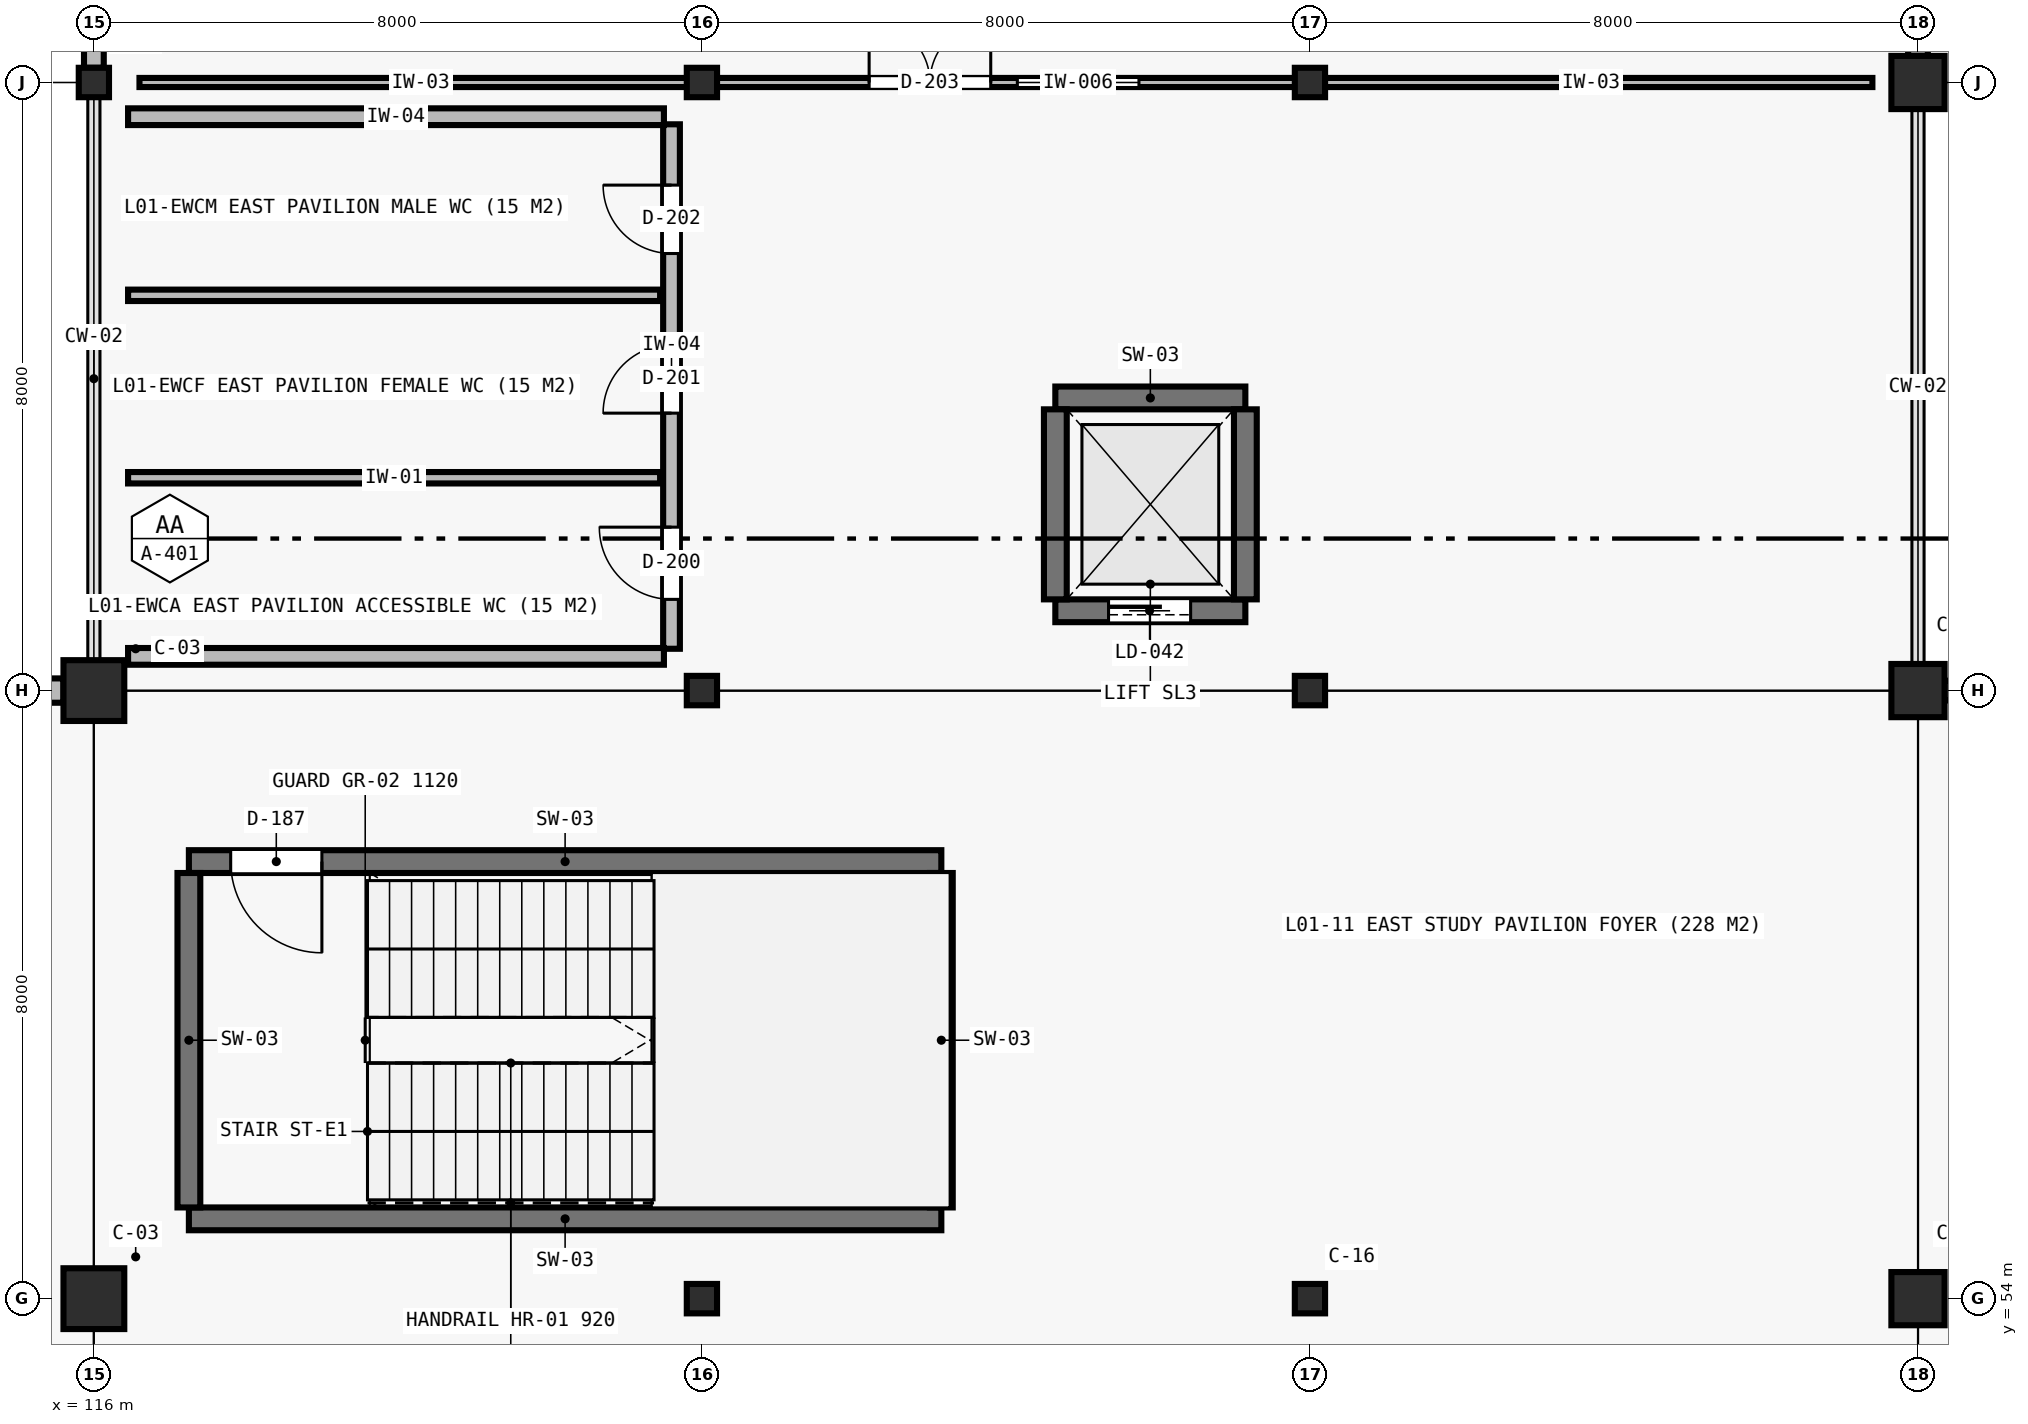
"""IFC4 building model, lengths in metres.
Left out: names, types, materials, properties, quantities, classifications, styles, units other than length and angle.
Written with IfcOpenShell. Run it as: python <this file> out.ifc"""

import sys

from ifc_helpers import new_model, si_unit, direction, frame, frame_2d, origin, origin_2d, place, context, subcontext, project, spatial, rectangle, i_section, extrude, element, fill, save


model = new_model("IFC4")
c1 = context("Model", 3, precision=1e-05, world=origin(), true_north=direction((0.0, 1.0)))
c2 = subcontext(c1, "Body", "Model", "MODEL_VIEW")
j1 = project(units=[si_unit("LENGTHUNIT", "METRE"), si_unit("PLANEANGLEUNIT", "RADIAN")], contexts=[c1])
p1 = place(None, origin())
s1 = spatial("IfcSite", under=j1, at=p1, CompositionType="ELEMENT")
p2 = place(p1, origin())
s2 = spatial("IfcBuilding", under=s1, at=p2, CompositionType="ELEMENT")
p3 = place(p2, frame((0.0, 0.0, 6.3)))
s3 = spatial("IfcBuildingStorey", under=s2, at=p3, CompositionType="ELEMENT", Elevation=6.3)
for number, where, z_axis, x_axis in (
    (1, (116.0, 54.0, 0.0), (0.0, 0.0, 1.0), (1.0, 0.0, 0.0)),
    (2, (116.0, 62.0, 0.0), (0.0, 0.0, 1.0), (1.0, 0.0, 0.0)),
):
    element("IfcColumn", number, at=place(p3, frame(where, z_axis=z_axis, x_axis=x_axis)), inside=s3, PredefinedType="COLUMN", context=c2, shape_type="SweptSolid", body=[
        extrude(rectangle(XDim=0.8, YDim=0.8, at=origin_2d()), origin(), (0.0, 0.0, 1.0), 4.6),
    ])
for number, where, z_axis, x_axis in (
    (3, (116.0, 70.0, 0.0), (0.0, 0.0, 1.0), (1.0, 0.0, 0.0)),
    (4, (124.0, 54.0, 0.0), (0.0, 0.0, 1.0), (1.0, 0.0, 0.0)),
    (5, (124.0, 62.0, 0.0), (0.0, 0.0, 1.0), (1.0, 0.0, 0.0)),
    (6, (124.0, 70.0, 0.0), (0.0, 0.0, 1.0), (1.0, 0.0, 0.0)),
    (7, (132.0, 54.0, 0.0), (0.0, 0.0, 1.0), (1.0, 0.0, 0.0)),
    (8, (132.0, 62.0, 0.0), (0.0, 0.0, 1.0), (1.0, 0.0, 0.0)),
    (9, (132.0, 70.0, 0.0), (0.0, 0.0, 1.0), (1.0, 0.0, 0.0)),
):
    element("IfcColumn", number, at=place(p3, frame(where, z_axis=z_axis, x_axis=x_axis)), inside=s3, PredefinedType="COLUMN", context=c2, shape_type="SweptSolid", body=[
        extrude(i_section(OverallWidth=0.398, OverallDepth=0.387, WebThickness=0.021, FlangeThickness=0.033, at=origin_2d()), origin(), (0.0, 0.0, 1.0), 4.6),
    ])
for number, where, z_axis, x_axis in (
    (10, (140.0, 54.0, 0.0), (0.0, 0.0, 1.0), (1.0, 0.0, 0.0)),
    (11, (140.0, 62.0, 0.0), (0.0, 0.0, 1.0), (1.0, 0.0, 0.0)),
    (12, (140.0, 70.0, 0.0), (0.0, 0.0, 1.0), (1.0, 0.0, 0.0)),
):
    element("IfcColumn", number, at=place(p3, frame(where, z_axis=z_axis, x_axis=x_axis)), inside=s3, PredefinedType="COLUMN", context=c2, shape_type="SweptSolid", body=[
        extrude(rectangle(XDim=0.7, YDim=0.7, at=origin_2d()), origin(), (0.0, 0.0, 1.0), 4.6),
    ])
p4 = place(p3, frame((117.25, 59.75, 0.0), z_axis=(0.0, 0.0, 1.0), x_axis=(1.0, 0.0, 0.0)))
e13 = element("IfcWall", 13, at=p4, inside=s3, PredefinedType="SHEAR", context=c2, shape_type="SweptSolid", body=[
    extrude(rectangle(XDim=9.9, YDim=0.3, at=frame_2d((4.95, 0.0))), origin(), (0.0, 0.0, 1.0), 4.6),
])
p5 = place(p4, frame((0.55, 0.0, 0.0)))
e14 = element("IfcOpeningElement", 14, at=p5, cuts=e13, PredefinedType="OPENING", context=c2, shape_type="SweptSolid", body=[
    extrude(rectangle(XDim=1.2, YDim=2.2, at=frame_2d((0.6, 1.1))), frame((0.0, 0.16, 0.0), z_axis=(0.0, -1.0, 0.0), x_axis=(1.0, 0.0, 0.0)), (0.0, 0.0, 1.0), 0.32),
])
p6 = place(p3, frame((117.25, 55.05, 0.0), z_axis=(0.0, 0.0, 1.0), x_axis=(1.0, 0.0, 0.0)))
e15 = element("IfcWall", 15, at=p6, inside=s3, PredefinedType="SHEAR", context=c2, shape_type="SweptSolid", body=[
    extrude(rectangle(XDim=9.9, YDim=0.3, at=frame_2d((4.95, 0.0))), origin(), (0.0, 0.0, 1.0), 4.6),
])
for number, where, z_axis, x_axis in (
    (16, (117.25, 55.2, 0.0), (0.0, 0.0, 1.0), (0.0, 1.0, 0.0)),
    (17, (127.15, 55.2, 0.0), (0.0, 0.0, 1.0), (0.0, 1.0, 0.0)),
):
    element("IfcWall", number, at=place(p3, frame(where, z_axis=z_axis, x_axis=x_axis)), inside=s3, PredefinedType="SHEAR", context=c2, shape_type="SweptSolid", body=[
        extrude(rectangle(XDim=4.4, YDim=0.3, at=frame_2d((2.2, 0.0))), origin(), (0.0, 0.0, 1.0), 4.6),
    ])
p7 = place(p3, frame((128.65, 65.85, 0.0), z_axis=(0.0, 0.0, 1.0), x_axis=(1.0, 0.0, 0.0)))
e18 = element("IfcWall", 18, at=p7, inside=s3, PredefinedType="SHEAR", context=c2, shape_type="SweptSolid", body=[
    extrude(rectangle(XDim=2.5, YDim=0.3, at=frame_2d((1.25, 0.0))), origin(), (0.0, 0.0, 1.0), 4.6),
])
p8 = place(p3, frame((128.65, 63.05, 0.0), z_axis=(0.0, 0.0, 1.0), x_axis=(1.0, 0.0, 0.0)))
e19 = element("IfcWall", 19, at=p8, inside=s3, PredefinedType="SHEAR", context=c2, shape_type="SweptSolid", body=[
    extrude(rectangle(XDim=2.5, YDim=0.3, at=frame_2d((1.25, 0.0))), origin(), (0.0, 0.0, 1.0), 4.6),
])
p9 = place(p8, frame((0.7, 0.0, 0.0)))
e20 = element("IfcOpeningElement", 20, at=p9, cuts=e19, PredefinedType="OPENING", context=c2, shape_type="SweptSolid", body=[
    extrude(rectangle(XDim=1.08, YDim=2.2, at=frame_2d((0.54, 1.1))), frame((0.0, 0.16, 0.0), z_axis=(0.0, -1.0, 0.0), x_axis=(1.0, 0.0, 0.0)), (0.0, 0.0, 1.0), 0.32),
])
for number, where, z_axis, x_axis in (
    (21, (128.65, 63.2, 0.0), (0.0, 0.0, 1.0), (0.0, 1.0, 0.0)),
    (22, (131.15, 63.2, 0.0), (0.0, 0.0, 1.0), (0.0, 1.0, 0.0)),
):
    element("IfcWall", number, at=place(p3, frame(where, z_axis=z_axis, x_axis=x_axis)), inside=s3, PredefinedType="SHEAR", context=c2, shape_type="SweptSolid", body=[
        extrude(rectangle(XDim=2.5, YDim=0.3, at=frame_2d((1.25, 0.0))), origin(), (0.0, 0.0, 1.0), 4.6),
    ])
p10 = place(p3, frame((108.4, 62.0, 0.0), z_axis=(0.0, 0.0, 1.0), x_axis=(1.0, 0.0, 0.0)))
e23 = element("IfcWall", 23, at=p10, inside=s3, PredefinedType="STANDARD", context=c2, shape_type="SweptSolid", body=[
    extrude(rectangle(XDim=7.2, YDim=0.32, at=frame_2d((3.6, 0.0))), origin(), (0.0, 0.0, 1.0), 3.85),
])
p11 = place(p10, frame((2.25, 0.0, 0.95)))
e24 = element("IfcOpeningElement", 24, at=p11, cuts=e23, PredefinedType="OPENING", context=c2, shape_type="SweptSolid", body=[
    extrude(rectangle(XDim=2.7, YDim=1.95, at=frame_2d((1.35, 0.975))), frame((0.0, 0.17, 0.0), z_axis=(0.0, -1.0, 0.0), x_axis=(1.0, 0.0, 0.0)), (0.0, 0.0, 1.0), 0.34),
])
p12 = place(p3, frame((116.0, 70.194, 0.0), z_axis=(0.0, 0.0, 1.0), x_axis=(0.0, 1.0, 0.0)))
e25 = element("IfcWall", 25, at=p12, inside=s3, PredefinedType="STANDARD", context=c2, shape_type="SweptSolid", body=[
    extrude(rectangle(XDim=7.613, YDim=0.26, at=frame_2d((3.806, 0.0))), origin(), (0.0, 0.0, 1.0), 3.85),
])
p13 = place(p12, frame((3.007, 0.0, 0.95)))
e26 = element("IfcOpeningElement", 26, at=p13, cuts=e25, PredefinedType="OPENING", context=c2, shape_type="SweptSolid", body=[
    extrude(rectangle(XDim=1.6, YDim=2.2, at=frame_2d((0.8, 1.1))), frame((0.0, 0.14, 0.0), z_axis=(0.0, -1.0, 0.0), x_axis=(1.0, 0.0, 0.0)), (0.0, 0.0, 1.0), 0.28),
])
p14 = place(p3, frame((140.0, 77.65, 0.0), z_axis=(0.0, 0.0, 1.0), x_axis=(0.0, -1.0, 0.0)))
e27 = element("IfcWall", 27, at=p14, inside=s3, PredefinedType="STANDARD", context=c2, shape_type="SweptSolid", body=[
    extrude(rectangle(XDim=7.3, YDim=0.26, at=frame_2d((3.65, 0.0))), origin(), (0.0, 0.0, 1.0), 3.85),
])
p15 = place(p14, frame((2.575, 0.0, 0.95)))
e28 = element("IfcOpeningElement", 28, at=p15, cuts=e27, PredefinedType="OPENING", context=c2, shape_type="SweptSolid", body=[
    extrude(rectangle(XDim=2.15, YDim=1.5, at=frame_2d((1.075, 0.75))), frame((0.0, 0.14, 0.0), z_axis=(0.0, -1.0, 0.0), x_axis=(1.0, 0.0, 0.0)), (0.0, 0.0, 1.0), 0.28),
])
p16 = place(p3, frame((140.35, 62.0, 0.0), z_axis=(0.0, 0.0, 1.0), x_axis=(1.0, 0.0, 0.0)))
e29 = element("IfcWall", 29, at=p16, inside=s3, PredefinedType="STANDARD", context=c2, shape_type="SweptSolid", body=[
    extrude(rectangle(XDim=7.3, YDim=0.26, at=frame_2d((3.65, 0.0))), origin(), (0.0, 0.0, 1.0), 3.85),
])
p17 = place(p16, frame((2.575, 0.0, 0.95)))
e30 = element("IfcOpeningElement", 30, at=p17, cuts=e29, PredefinedType="OPENING", context=c2, shape_type="SweptSolid", body=[
    extrude(rectangle(XDim=2.15, YDim=1.5, at=frame_2d((1.075, 0.75))), frame((0.0, 0.14, 0.0), z_axis=(0.0, -1.0, 0.0), x_axis=(1.0, 0.0, 0.0)), (0.0, 0.0, 1.0), 0.28),
])
p18 = place(p3, frame((123.6, 62.55, 0.0), z_axis=(0.0, 0.0, 1.0), x_axis=(0.0, 1.0, 0.0)))
e31 = element("IfcWall", 31, at=p18, inside=s3, PredefinedType="PLUMBINGWALL", context=c2, shape_type="SweptSolid", body=[
    extrude(rectangle(XDim=6.9, YDim=0.22, at=frame_2d((3.45, 0.0))), origin(), (0.0, 0.0, 1.0), 4.6),
])
p19 = place(p18, frame((0.65, 0.0, 0.0)))
e32 = element("IfcOpeningElement", 32, at=p19, cuts=e31, PredefinedType="OPENING", context=c2, shape_type="SweptSolid", body=[
    extrude(rectangle(XDim=0.95, YDim=2.1, at=frame_2d((0.475, 1.05))), frame((0.0, 0.12, 0.0), z_axis=(0.0, -1.0, 0.0), x_axis=(1.0, 0.0, 0.0)), (0.0, 0.0, 1.0), 0.24),
])
p20 = place(p18, frame((3.1, 0.0, 0.0)))
e33 = element("IfcOpeningElement", 33, at=p20, cuts=e31, PredefinedType="OPENING", context=c2, shape_type="SweptSolid", body=[
    extrude(rectangle(XDim=0.9, YDim=2.1, at=frame_2d((0.45, 1.05))), frame((0.0, 0.12, 0.0), z_axis=(0.0, -1.0, 0.0), x_axis=(1.0, 0.0, 0.0)), (0.0, 0.0, 1.0), 0.24),
])
p21 = place(p18, frame((5.2, 0.0, 0.0)))
e34 = element("IfcOpeningElement", 34, at=p21, cuts=e31, PredefinedType="OPENING", context=c2, shape_type="SweptSolid", body=[
    extrude(rectangle(XDim=0.9, YDim=2.1, at=frame_2d((0.45, 1.05))), frame((0.0, 0.12, 0.0), z_axis=(0.0, -1.0, 0.0), x_axis=(1.0, 0.0, 0.0)), (0.0, 0.0, 1.0), 0.24),
])
for number, where, z_axis, x_axis in (
    (35, (116.45, 69.55, 0.0), (0.0, 0.0, 1.0), (1.0, 0.0, 0.0)),
    (36, (116.45, 62.45, 0.0), (0.0, 0.0, 1.0), (1.0, 0.0, 0.0)),
):
    element("IfcWall", number, at=place(p3, frame(where, z_axis=z_axis, x_axis=x_axis)), inside=s3, PredefinedType="PLUMBINGWALL", context=c2, shape_type="SweptSolid", body=[
        extrude(rectangle(XDim=7.05, YDim=0.22, at=frame_2d((3.525, 0.0))), origin(), (0.0, 0.0, 1.0), 4.6),
    ])
for number, where, z_axis, x_axis in (
    (37, (116.45, 64.8, 0.0), (0.0, 0.0, 1.0), (1.0, 0.0, 0.0)),
    (38, (116.45, 67.2, 0.0), (0.0, 0.0, 1.0), (1.0, 0.0, 0.0)),
):
    element("IfcWall", number, at=place(p3, frame(where, z_axis=z_axis, x_axis=x_axis)), inside=s3, PredefinedType="PARTITIONING", context=c2, shape_type="SweptSolid", body=[
        extrude(rectangle(XDim=7.0, YDim=0.15, at=frame_2d((3.5, 0.0))), origin(), (0.0, 0.0, 1.0), 4.6),
    ])
p22 = place(p3, frame((116.6, 70.0, 0.0), z_axis=(0.0, 0.0, 1.0), x_axis=(1.0, 0.0, 0.0)))
e39 = element("IfcWall", 39, at=p22, inside=s3, PredefinedType="PARTITIONING", context=c2, shape_type="SweptSolid", body=[
    extrude(rectangle(XDim=7.4, YDim=0.12, at=frame_2d((3.7, 0.0))), origin(), (0.0, 0.0, 1.0), 3.85),
])
p23 = place(p3, frame((124.0, 70.0, 0.0), z_axis=(0.0, 0.0, 1.0), x_axis=(1.0, 0.0, 0.0)))
e40 = element("IfcWall", 40, at=p23, inside=s3, PredefinedType="PARTITIONING", context=c2, shape_type="SweptSolid", body=[
    extrude(rectangle(XDim=8.0, YDim=0.12, at=frame_2d((4.0, 0.0))), origin(), (0.0, 0.0, 1.0), 3.988),
])
p24 = place(p23, frame((2.2, 0.0, 0.0)))
e41 = element("IfcOpeningElement", 41, at=p24, cuts=e40, PredefinedType="OPENING", context=c2, shape_type="SweptSolid", body=[
    extrude(rectangle(XDim=1.6, YDim=2.2, at=frame_2d((0.8, 1.1))), frame((0.0, 0.07, 0.0), z_axis=(0.0, -1.0, 0.0), x_axis=(1.0, 0.0, 0.0)), (0.0, 0.0, 1.0), 0.14),
])
p25 = place(p23, frame((4.15, 0.0, 0.95)))
e42 = element("IfcOpeningElement", 42, at=p25, cuts=e40, PredefinedType="OPENING", context=c2, shape_type="SweptSolid", body=[
    extrude(rectangle(XDim=1.6, YDim=1.3, at=frame_2d((0.8, 0.65))), frame((0.0, 0.07, 0.0), z_axis=(0.0, -1.0, 0.0), x_axis=(1.0, 0.0, 0.0)), (0.0, 0.0, 1.0), 0.14),
])
p26 = place(p3, frame((132.0, 70.0, 0.0), z_axis=(0.0, 0.0, 1.0), x_axis=(1.0, 0.0, 0.0)))
e43 = element("IfcWall", 43, at=p26, inside=s3, PredefinedType="PARTITIONING", context=c2, shape_type="SweptSolid", body=[
    extrude(rectangle(XDim=7.4, YDim=0.12, at=frame_2d((3.7, 0.0))), origin(), (0.0, 0.0, 1.0), 3.85),
])
p27 = place(p5, frame((1.2, 0.0, 0.0), z_axis=(0.0, 0.0, 1.0), x_axis=(-1.0, 0.0, 0.0)))
e44 = element("IfcDoor", 44, at=p27, inside=s3, OperationType="SINGLE_SWING_LEFT", PredefinedType="DOOR", context=c2, shape_type="SweptSolid", body=[
    extrude(rectangle(XDim=1.2, YDim=2.2, at=frame_2d((0.6, 1.1))), frame((0.0, 0.025, 0.0), z_axis=(0.0, -1.0, 0.0), x_axis=(1.0, 0.0, 0.0)), (0.0, 0.0, 1.0), 0.05),
])
fill(e14, e44)
p28 = place(p9, origin())
e45 = element("IfcDoor", 45, at=p28, inside=s3, OperationType="SLIDING_TO_LEFT", PredefinedType="DOOR", context=c2, shape_type="SweptSolid", body=[
    extrude(rectangle(XDim=1.08, YDim=2.2, at=frame_2d((0.54, 1.1))), frame((0.0, 0.025, 0.0), z_axis=(0.0, -1.0, 0.0), x_axis=(1.0, 0.0, 0.0)), (0.0, 0.0, 1.0), 0.05),
])
fill(e20, e45)
p29 = place(p19, origin())
e46 = element("IfcDoor", 46, at=p29, inside=s3, OperationType="SINGLE_SWING_RIGHT", PredefinedType="DOOR", context=c2, shape_type="SweptSolid", body=[
    extrude(rectangle(XDim=0.95, YDim=2.1, at=frame_2d((0.475, 1.05))), frame((0.0, 0.025, 0.0), z_axis=(0.0, -1.0, 0.0), x_axis=(1.0, 0.0, 0.0)), (0.0, 0.0, 1.0), 0.05),
])
fill(e32, e46)
p30 = place(p20, origin())
e47 = element("IfcDoor", 47, at=p30, inside=s3, OperationType="SINGLE_SWING_LEFT", PredefinedType="DOOR", context=c2, shape_type="SweptSolid", body=[
    extrude(rectangle(XDim=0.9, YDim=2.1, at=frame_2d((0.45, 1.05))), frame((0.0, 0.025, 0.0), z_axis=(0.0, -1.0, 0.0), x_axis=(1.0, 0.0, 0.0)), (0.0, 0.0, 1.0), 0.05),
])
fill(e33, e47)
p31 = place(p21, origin())
e48 = element("IfcDoor", 48, at=p31, inside=s3, OperationType="SINGLE_SWING_RIGHT", PredefinedType="DOOR", context=c2, shape_type="SweptSolid", body=[
    extrude(rectangle(XDim=0.9, YDim=2.1, at=frame_2d((0.45, 1.05))), frame((0.0, 0.025, 0.0), z_axis=(0.0, -1.0, 0.0), x_axis=(1.0, 0.0, 0.0)), (0.0, 0.0, 1.0), 0.05),
])
fill(e34, e48)
p32 = place(p24, origin())
e49 = element("IfcDoor", 49, at=p32, inside=s3, OperationType="DOUBLE_DOOR_SINGLE_SWING", PredefinedType="DOOR", context=c2, shape_type="SweptSolid", body=[
    extrude(rectangle(XDim=1.6, YDim=2.2, at=frame_2d((0.8, 1.1))), frame((0.0, 0.025, 0.0), z_axis=(0.0, -1.0, 0.0), x_axis=(1.0, 0.0, 0.0)), (0.0, 0.0, 1.0), 0.05),
])
fill(e41, e49)
p33 = place(p25, origin())
e50 = element("IfcWindow", 50, at=p33, inside=s3, PartitioningType="SINGLE_PANEL", PredefinedType="WINDOW", context=c2, shape_type="SweptSolid", body=[
    extrude(rectangle(XDim=1.6, YDim=1.3, at=frame_2d((0.8, 0.65))), frame((0.0, 0.03, 0.0), z_axis=(0.0, -1.0, 0.0), x_axis=(1.0, 0.0, 0.0)), (0.0, 0.0, 1.0), 0.06),
])
fill(e42, e50)
save(model, sys.argv[1])
